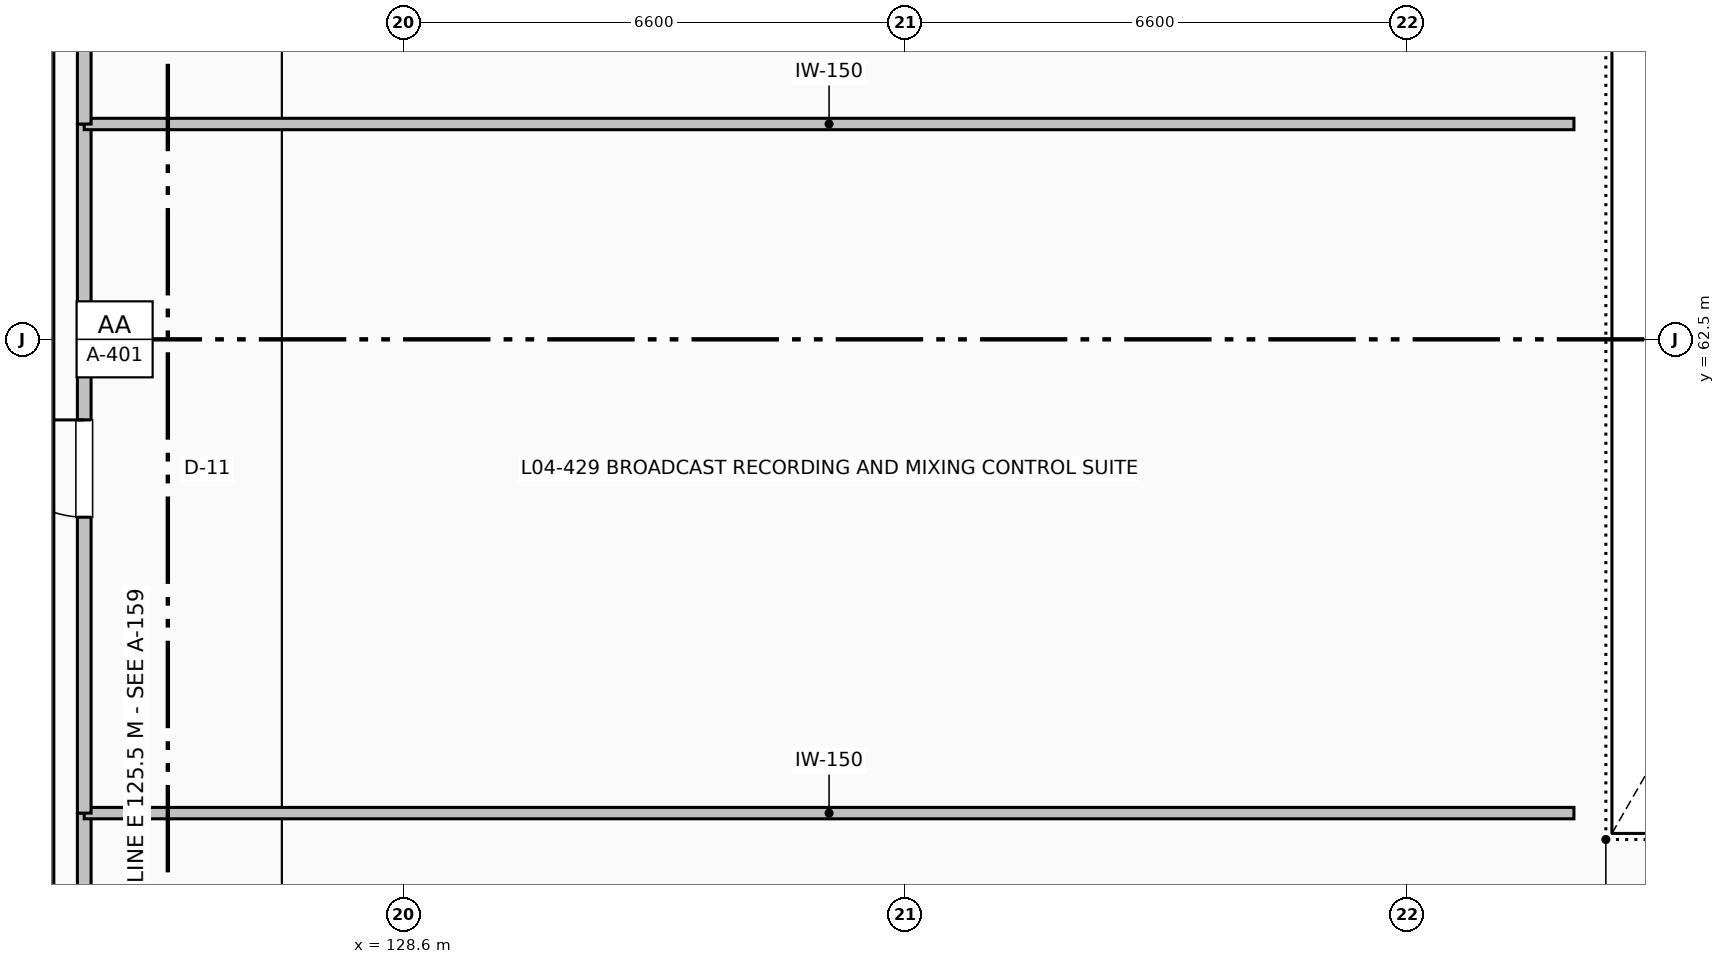
"""IFC4 building model, lengths in metres.
Left out: names, types, materials, properties, quantities, classifications, styles, units other than length and angle.
Written with IfcOpenShell. Run it as: python <this file> out.ifc"""

import sys

from ifc_helpers import new_model, si_unit, direction, frame, frame_2d, origin, place, context, subcontext, project, spatial, rectangle, extrude, element, fill, save


model = new_model("IFC4")
c1 = context("Model", 3, precision=1e-05, world=origin(), true_north=direction((0.0, 1.0)))
c2 = subcontext(c1, "Body", "Model", "MODEL_VIEW")
j1 = project(units=[si_unit("LENGTHUNIT", "METRE"), si_unit("PLANEANGLEUNIT", "RADIAN")], contexts=[c1])
p1 = place(None, origin())
s1 = spatial("IfcSite", under=j1, at=p1, CompositionType="ELEMENT")
p2 = place(p1, origin())
s2 = spatial("IfcBuilding", under=s1, at=p2, CompositionType="ELEMENT")
p3 = place(p2, frame((0.0, 0.0, 19.5)))
s3 = spatial("IfcBuildingStorey", under=s2, at=p3, CompositionType="ELEMENT", Elevation=19.5)
p4 = place(p3, frame((124.4, 47.2, 0.0), z_axis=(0.0, 0.0, 1.0), x_axis=(0.0, 1.0, 0.0)))
e1 = element("IfcWall", 1, at=p4, inside=s3, PredefinedType="PARTITIONING", context=c2, shape_type="SweptSolid", body=[
    extrude(rectangle(XDim=9.067, YDim=0.18, at=frame_2d((4.534, 0.0))), origin(), (0.0, 0.0, 1.0), 4.192),
])
p5 = place(p4, frame((3.934, 0.0, 0.0)))
e2 = element("IfcOpeningElement", 2, at=p5, cuts=e1, PredefinedType="OPENING", context=c2, shape_type="SweptSolid", body=[
    extrude(rectangle(XDim=1.2, YDim=2.1, at=frame_2d((0.6, 1.05))), frame((0.0, 0.1, 0.0), z_axis=(0.0, -1.0, 0.0), x_axis=(1.0, 0.0, 0.0)), (0.0, 0.0, 1.0), 0.2),
])
p6 = place(p3, frame((124.4, 56.267, 0.0), z_axis=(0.0, 0.0, 1.0), x_axis=(1.0, 0.0, 0.0)))
e3 = element("IfcWall", 3, at=p6, inside=s3, PredefinedType="PARTITIONING", context=c2, shape_type="SweptSolid", body=[
    extrude(rectangle(XDim=19.6, YDim=0.15, at=frame_2d((9.8, 0.0))), origin(), (0.0, 0.0, 1.0), 3.503),
])
p7 = place(p3, frame((124.4, 56.267, 0.0), z_axis=(0.0, 0.0, 1.0), x_axis=(0.0, 1.0, 0.0)))
e4 = element("IfcWall", 4, at=p7, inside=s3, PredefinedType="PARTITIONING", context=c2, shape_type="SweptSolid", body=[
    extrude(rectangle(XDim=9.066, YDim=0.18, at=frame_2d((4.533, 0.0))), origin(), (0.0, 0.0, 1.0), 4.192),
])
p8 = place(p7, frame((3.893, 0.0, 0.0)))
e5 = element("IfcOpeningElement", 5, at=p8, cuts=e4, PredefinedType="OPENING", context=c2, shape_type="SweptSolid", body=[
    extrude(rectangle(XDim=1.28, YDim=2.14, at=frame_2d((0.64, 1.07))), frame((0.0, 0.1, 0.0), z_axis=(0.0, -1.0, 0.0), x_axis=(1.0, 0.0, 0.0)), (0.0, 0.0, 1.0), 0.2),
])
p9 = place(p3, frame((124.4, 65.333, 0.0), z_axis=(0.0, 0.0, 1.0), x_axis=(1.0, 0.0, 0.0)))
e6 = element("IfcWall", 6, at=p9, inside=s3, PredefinedType="PARTITIONING", context=c2, shape_type="SweptSolid", body=[
    extrude(rectangle(XDim=19.6, YDim=0.15, at=frame_2d((9.8, 0.0))), origin(), (0.0, 0.0, 1.0), 3.503),
])
p10 = place(p3, frame((124.4, 65.333, 0.0), z_axis=(0.0, 0.0, 1.0), x_axis=(0.0, 1.0, 0.0)))
e7 = element("IfcWall", 7, at=p10, inside=s3, PredefinedType="PARTITIONING", context=c2, shape_type="SweptSolid", body=[
    extrude(rectangle(XDim=9.067, YDim=0.18, at=frame_2d((4.533, 0.0))), origin(), (0.0, 0.0, 1.0), 4.192),
])
p11 = place(p10, frame((4.009, 0.0, 0.0)))
e8 = element("IfcOpeningElement", 8, at=p11, cuts=e7, PredefinedType="OPENING", context=c2, shape_type="SweptSolid", body=[
    extrude(rectangle(XDim=1.05, YDim=2.1, at=frame_2d((0.525, 1.05))), frame((0.0, 0.1, 0.0), z_axis=(0.0, -1.0, 0.0), x_axis=(1.0, 0.0, 0.0)), (0.0, 0.0, 1.0), 0.2),
])
p12 = place(p8, origin())
e9 = element("IfcDoor", 9, at=p12, inside=s3, OperationType="SINGLE_SWING_RIGHT", PredefinedType="DOOR", context=c2, shape_type="SweptSolid", body=[
    extrude(rectangle(XDim=1.28, YDim=2.14, at=frame_2d((0.64, 1.07))), frame((0.0, 0.025, 0.0), z_axis=(0.0, -1.0, 0.0), x_axis=(1.0, 0.0, 0.0)), (0.0, 0.0, 1.0), 0.05),
])
fill(e5, e9)
save(model, sys.argv[1])
